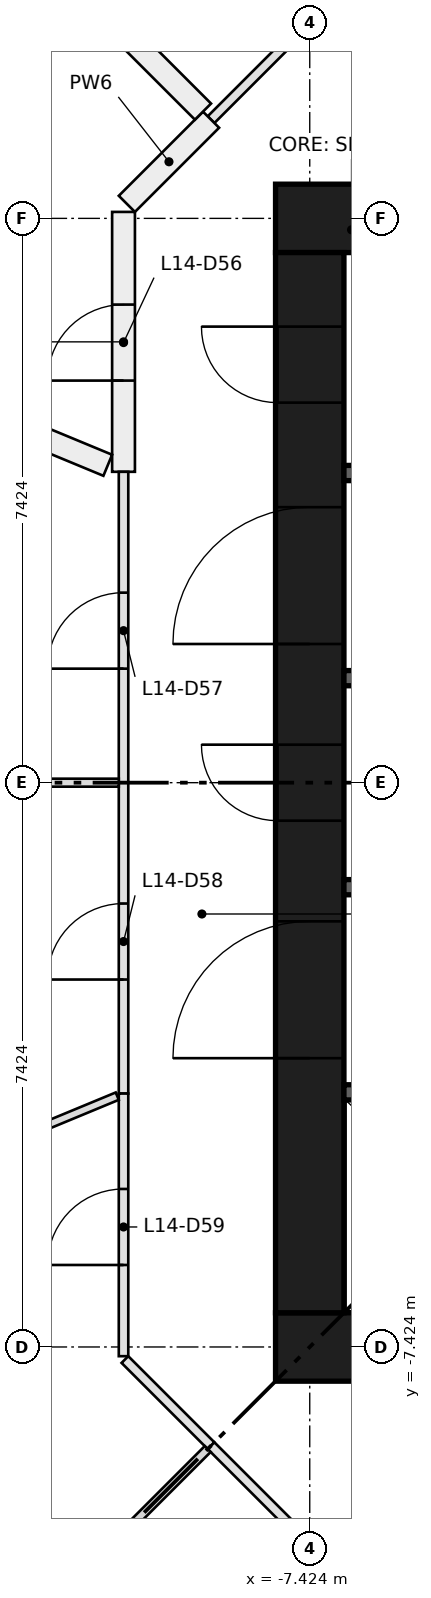
"""IFC4 building model, lengths in metres.
Left out: names, types, materials, properties, quantities, classifications, styles, units other than length and angle.
Written with IfcOpenShell. Run it as: python <this file> out.ifc"""

import sys

from ifc_helpers import new_model, si_unit, direction, frame, frame_2d, origin, place, context, subcontext, project, spatial, rectangle, extrude, element, fill, save


model = new_model("IFC4")
c1 = context("Model", 3, precision=1e-05, world=origin(), true_north=direction((0.0, 1.0)))
c2 = subcontext(c1, "Body", "Model", "MODEL_VIEW")
j1 = project(units=[si_unit("LENGTHUNIT", "METRE"), si_unit("PLANEANGLEUNIT", "RADIAN")], contexts=[c1])
p1 = place(None, origin())
s1 = spatial("IfcSite", under=j1, at=p1, CompositionType="ELEMENT")
p2 = place(p1, origin())
s2 = spatial("IfcBuilding", under=s1, at=p2, CompositionType="ELEMENT")
p3 = place(p2, frame((0.0, 0.0, 55.4)))
s3 = spatial("IfcBuildingStorey", under=s2, at=p3, CompositionType="ELEMENT", Elevation=55.4)
for number, where, z_axis, x_axis in (
    (1, (-7.874, -7.424, 0.0), (0.0, 0.0, 1.0), (1.0, 0.0, 0.0)),
    (2, (-7.874, 7.424, 0.0), (0.0, 0.0, 1.0), (1.0, 0.0, 0.0)),
):
    element("IfcWall", number, at=place(p3, frame(where, z_axis=z_axis, x_axis=x_axis)), inside=s3, PredefinedType="SHEAR", context=c2, shape_type="SweptSolid", body=[
        extrude(rectangle(XDim=15.748, YDim=0.9, at=frame_2d((7.874, 0.0))), origin(), (0.0, 0.0, 1.0), 3.65),
    ])
p4 = place(p3, frame((-7.424, -6.974, 0.0), z_axis=(0.0, 0.0, 1.0), x_axis=(0.0, 1.0, 0.0)))
e3 = element("IfcWall", 3, at=p4, inside=s3, PredefinedType="SHEAR", context=c2, shape_type="SweptSolid", body=[
    extrude(rectangle(XDim=13.948, YDim=0.9, at=frame_2d((6.974, 0.0))), origin(), (0.0, 0.0, 1.0), 3.65),
])
p5 = place(p4, frame((6.474, 0.0, 0.0)))
e4 = element("IfcOpeningElement", 4, at=p5, cuts=e3, PredefinedType="OPENING", context=c2, shape_type="SweptSolid", body=[
    extrude(rectangle(XDim=1.0, YDim=2.1, at=frame_2d((0.5, 1.05))), frame((0.0, 0.46, 0.0), z_axis=(0.0, -1.0, 0.0), x_axis=(1.0, 0.0, 0.0)), (0.0, 0.0, 1.0), 0.92),
])
p6 = place(p4, frame((3.35, 0.0, 0.0)))
e5 = element("IfcOpeningElement", 5, at=p6, cuts=e3, PredefinedType="OPENING", context=c2, shape_type="SweptSolid", body=[
    extrude(rectangle(XDim=1.8, YDim=2.1, at=frame_2d((0.9, 1.05))), frame((0.0, 0.46, 0.0), z_axis=(0.0, -1.0, 0.0), x_axis=(1.0, 0.0, 0.0)), (0.0, 0.0, 1.0), 0.92),
])
p7 = place(p4, frame((8.799, 0.0, 0.0)))
e6 = element("IfcOpeningElement", 6, at=p7, cuts=e3, PredefinedType="OPENING", context=c2, shape_type="SweptSolid", body=[
    extrude(rectangle(XDim=1.8, YDim=2.1, at=frame_2d((0.9, 1.05))), frame((0.0, 0.46, 0.0), z_axis=(0.0, -1.0, 0.0), x_axis=(1.0, 0.0, 0.0)), (0.0, 0.0, 1.0), 0.92),
])
p8 = place(p4, frame((11.974, 0.0, 0.0)))
e7 = element("IfcOpeningElement", 7, at=p8, cuts=e3, PredefinedType="OPENING", context=c2, shape_type="SweptSolid", body=[
    extrude(rectangle(XDim=1.0, YDim=2.1, at=frame_2d((0.5, 1.05))), frame((0.0, 0.46, 0.0), z_axis=(0.0, -1.0, 0.0), x_axis=(1.0, 0.0, 0.0)), (0.0, 0.0, 1.0), 0.92),
])
p9 = place(p3, frame((-6.974, -4.074, 0.0), z_axis=(0.0, 0.0, 1.0), x_axis=(1.0, 0.0, 0.0)))
e8 = element("IfcWall", 8, at=p9, inside=s3, PredefinedType="SHEAR", context=c2, shape_type="SweptSolid", body=[
    extrude(rectangle(XDim=13.948, YDim=0.2, at=frame_2d((6.974, 0.0))), origin(), (0.0, 0.0, 1.0), 3.3),
])
p10 = place(p9, frame((0.918, 0.0, 0.0)))
e9 = element("IfcOpeningElement", 9, at=p10, cuts=e8, PredefinedType="OPENING", context=c2, shape_type="SweptSolid", body=[
    extrude(rectangle(XDim=1.1, YDim=2.1, at=frame_2d((0.55, 1.05))), frame((0.0, 0.11, 0.0), z_axis=(0.0, -1.0, 0.0), x_axis=(1.0, 0.0, 0.0)), (0.0, 0.0, 1.0), 0.22),
])
p11 = place(p9, frame((4.055, 0.0, 0.0)))
e10 = element("IfcOpeningElement", 10, at=p11, cuts=e8, PredefinedType="OPENING", context=c2, shape_type="SweptSolid", body=[
    extrude(rectangle(XDim=1.1, YDim=2.1, at=frame_2d((0.55, 1.05))), frame((0.0, 0.11, 0.0), z_axis=(0.0, -1.0, 0.0), x_axis=(1.0, 0.0, 0.0)), (0.0, 0.0, 1.0), 0.22),
])
p12 = place(p9, frame((6.658, 0.0, 0.0)))
e11 = element("IfcOpeningElement", 11, at=p12, cuts=e8, PredefinedType="OPENING", context=c2, shape_type="SweptSolid", body=[
    extrude(rectangle(XDim=1.0, YDim=2.1, at=frame_2d((0.5, 1.05))), frame((0.0, 0.11, 0.0), z_axis=(0.0, -1.0, 0.0), x_axis=(1.0, 0.0, 0.0)), (0.0, 0.0, 1.0), 0.22),
])
p13 = place(p9, frame((8.627, 0.0, 0.0)))
e12 = element("IfcOpeningElement", 12, at=p13, cuts=e8, PredefinedType="OPENING", context=c2, shape_type="SweptSolid", body=[
    extrude(rectangle(XDim=1.0, YDim=2.1, at=frame_2d((0.5, 1.05))), frame((0.0, 0.11, 0.0), z_axis=(0.0, -1.0, 0.0), x_axis=(1.0, 0.0, 0.0)), (0.0, 0.0, 1.0), 0.22),
])
p14 = place(p9, frame((10.595, 0.0, 0.0)))
e13 = element("IfcOpeningElement", 13, at=p14, cuts=e8, PredefinedType="OPENING", context=c2, shape_type="SweptSolid", body=[
    extrude(rectangle(XDim=1.0, YDim=2.1, at=frame_2d((0.5, 1.05))), frame((0.0, 0.11, 0.0), z_axis=(0.0, -1.0, 0.0), x_axis=(1.0, 0.0, 0.0)), (0.0, 0.0, 1.0), 0.22),
])
p15 = place(p9, frame((12.564, 0.0, 0.0)))
e14 = element("IfcOpeningElement", 14, at=p15, cuts=e8, PredefinedType="OPENING", context=c2, shape_type="SweptSolid", body=[
    extrude(rectangle(XDim=1.0, YDim=2.1, at=frame_2d((0.5, 1.05))), frame((0.0, 0.11, 0.0), z_axis=(0.0, -1.0, 0.0), x_axis=(1.0, 0.0, 0.0)), (0.0, 0.0, 1.0), 0.22),
])
p16 = place(p3, frame((-6.974, 4.074, 0.0), z_axis=(0.0, 0.0, 1.0), x_axis=(1.0, 0.0, 0.0)))
e15 = element("IfcWall", 15, at=p16, inside=s3, PredefinedType="SHEAR", context=c2, shape_type="SweptSolid", body=[
    extrude(rectangle(XDim=6.974, YDim=0.2, at=frame_2d((3.487, 0.0))), origin(), (0.0, 0.0, 1.0), 3.3),
])
for number, where, z_axis, x_axis in (
    (16, (-6.974, -1.375, 0.0), (0.0, 0.0, 1.0), (1.0, 0.0, 0.0)),
    (17, (-6.974, 1.375, 0.0), (0.0, 0.0, 1.0), (1.0, 0.0, 0.0)),
):
    element("IfcWall", number, at=place(p3, frame(where, z_axis=z_axis, x_axis=x_axis)), inside=s3, PredefinedType="SHEAR", context=c2, shape_type="SweptSolid", body=[
        extrude(rectangle(XDim=2.6, YDim=0.2, at=frame_2d((1.3, 0.0))), origin(), (0.0, 0.0, 1.0), 3.3),
    ])
p17 = place(p3, frame((-8.722, 8.722, 0.0), z_axis=(0.0, 0.0, 1.0), x_axis=(0.707030604857, 0.70718294931, 0.0)))
e18 = element("IfcWall", 18, at=p17, inside=s3, PredefinedType="PARTITIONING", context=c2, shape_type="SweptSolid", body=[
    extrude(rectangle(XDim=1.603, YDim=0.125, at=frame_2d((0.801, 0.0))), origin(), (0.0, 0.0, 1.0), 3.3),
])
p18 = place(p3, frame((-9.874, 4.09, 0.0), z_axis=(0.0, 0.0, 1.0), x_axis=(0.0, 1.0, 0.0)))
e19 = element("IfcWall", 19, at=p18, inside=s3, PredefinedType="PARTITIONING", context=c2, shape_type="SweptSolid", body=[
    extrude(rectangle(XDim=3.419, YDim=0.3, at=frame_2d((1.709, 0.0))), origin(), (0.0, 0.0, 1.0), 3.3),
])
p19 = place(p18, frame((1.2, 0.0, 0.0)))
e20 = element("IfcOpeningElement", 20, at=p19, cuts=e19, PredefinedType="OPENING", context=c2, shape_type="SweptSolid", body=[
    extrude(rectangle(XDim=1.0, YDim=2.1, at=frame_2d((0.5, 1.05))), frame((0.0, 0.16, 0.0), z_axis=(0.0, -1.0, 0.0), x_axis=(1.0, 0.0, 0.0)), (0.0, 0.0, 1.0), 0.32),
])
p20 = place(p3, frame((-9.83, 7.615, 0.0), z_axis=(0.0, 0.0, 1.0), x_axis=(0.70718471217, 0.707028841614, 0.0)))
e21 = element("IfcWall", 21, at=p20, inside=s3, PredefinedType="PARTITIONING", context=c2, shape_type="SweptSolid", body=[
    extrude(rectangle(XDim=1.566, YDim=0.3, at=frame_2d((0.783, 0.0))), origin(), (0.0, 0.0, 1.0), 3.3),
])
p21 = place(p3, frame((-9.874, 0.0, 0.0), z_axis=(0.0, 0.0, 1.0), x_axis=(0.0, 1.0, 0.0)))
e22 = element("IfcWall", 22, at=p21, inside=s3, PredefinedType="PARTITIONING", context=c2, shape_type="SweptSolid", body=[
    extrude(rectangle(XDim=4.09, YDim=0.125, at=frame_2d((2.045, 0.0))), origin(), (0.0, 0.0, 1.0), 3.3),
])
p22 = place(p21, frame((1.5, 0.0, 0.0)))
e23 = element("IfcOpeningElement", 23, at=p22, cuts=e22, PredefinedType="OPENING", context=c2, shape_type="SweptSolid", body=[
    extrude(rectangle(XDim=1.0, YDim=2.1, at=frame_2d((0.5, 1.05))), frame((0.0, 0.073, 0.0), z_axis=(0.0, -1.0, 0.0), x_axis=(1.0, 0.0, 0.0)), (0.0, 0.0, 1.0), 0.145),
])
p23 = place(p3, frame((-9.874, -4.09, 0.0), z_axis=(0.0, 0.0, 1.0), x_axis=(0.0, 1.0, 0.0)))
e24 = element("IfcWall", 24, at=p23, inside=s3, PredefinedType="PARTITIONING", context=c2, shape_type="SweptSolid", body=[
    extrude(rectangle(XDim=4.09, YDim=0.125, at=frame_2d((2.045, 0.0))), origin(), (0.0, 0.0, 1.0), 3.3),
])
p24 = place(p23, frame((1.5, 0.0, 0.0)))
e25 = element("IfcOpeningElement", 25, at=p24, cuts=e24, PredefinedType="OPENING", context=c2, shape_type="SweptSolid", body=[
    extrude(rectangle(XDim=1.0, YDim=2.1, at=frame_2d((0.5, 1.05))), frame((0.0, 0.073, 0.0), z_axis=(0.0, -1.0, 0.0), x_axis=(1.0, 0.0, 0.0)), (0.0, 0.0, 1.0), 0.145),
])
p25 = place(p3, frame((-9.874, -7.545, 0.0), z_axis=(0.0, 0.0, 1.0), x_axis=(0.0, 1.0, 0.0)))
e26 = element("IfcWall", 26, at=p25, inside=s3, PredefinedType="PARTITIONING", context=c2, shape_type="SweptSolid", body=[
    extrude(rectangle(XDim=3.455, YDim=0.125, at=frame_2d((1.728, 0.0))), origin(), (0.0, 0.0, 1.0), 3.3),
])
p26 = place(p25, frame((1.2, 0.0, 0.0)))
e27 = element("IfcOpeningElement", 27, at=p26, cuts=e26, PredefinedType="OPENING", context=c2, shape_type="SweptSolid", body=[
    extrude(rectangle(XDim=1.0, YDim=2.1, at=frame_2d((0.5, 1.05))), frame((0.0, 0.073, 0.0), z_axis=(0.0, -1.0, 0.0), x_axis=(1.0, 0.0, 0.0)), (0.0, 0.0, 1.0), 0.145),
])
for number, where, z_axis, x_axis in (
    (28, (-8.722, -8.722, 0.0), (0.0, 0.0, 1.0), (-0.707, 0.707, 0.0)),
    (29, (-7.589, -9.856, 0.0), (0.0, 0.0, 1.0), (-0.707, 0.707, 0.0)),
):
    element("IfcWall", number, at=place(p3, frame(where, z_axis=z_axis, x_axis=x_axis)), inside=s3, PredefinedType="PARTITIONING", context=c2, shape_type="SweptSolid", body=[
        extrude(rectangle(XDim=1.603, YDim=0.125, at=frame_2d((0.801, 0.0))), origin(), (0.0, 0.0, 1.0), 3.3),
    ])
p27 = place(p3, frame((-8.829, 8.829, 0.0), z_axis=(0.0, 0.0, 1.0), x_axis=(-0.707106781187, 0.707106781187, 0.0)))
e30 = element("IfcWall", 30, at=p27, inside=s3, PredefinedType="PARTITIONING", context=c2, shape_type="SweptSolid", body=[
    extrude(rectangle(XDim=5.914, YDim=0.3, at=frame_2d((2.957, 0.0))), origin(), (0.0, 0.0, 1.0), 3.3),
])
p28 = place(p3, frame((-10.081, 4.176, 0.0), z_axis=(0.0, 0.0, 1.0), x_axis=(-0.923876033225, 0.382691880281, 0.0)))
e31 = element("IfcWall", 31, at=p28, inside=s3, PredefinedType="PARTITIONING", context=c2, shape_type="SweptSolid", body=[
    extrude(rectangle(XDim=3.318, YDim=0.3, at=frame_2d((1.659, 0.0))), origin(), (0.0, 0.0, 1.0), 3.3),
])
p29 = place(p3, frame((-9.937, 0.0, 0.0), z_axis=(0.0, 0.0, 1.0), x_axis=(-1.0, 0.0, 0.0)))
e32 = element("IfcWall", 32, at=p29, inside=s3, PredefinedType="PARTITIONING", context=c2, shape_type="SweptSolid", body=[
    extrude(rectangle(XDim=4.237, YDim=0.105, at=frame_2d((2.119, 0.0))), origin(), (0.0, 0.0, 1.0), 3.3),
])
p30 = place(p3, frame((-9.957, -4.124, 0.0), z_axis=(0.0, 0.0, 1.0), x_axis=(-0.923867748948, -0.382711879165, 0.0)))
e33 = element("IfcWall", 33, at=p30, inside=s3, PredefinedType="PARTITIONING", context=c2, shape_type="SweptSolid", body=[
    extrude(rectangle(XDim=3.453, YDim=0.105, at=frame_2d((1.727, 0.0))), origin(), (0.0, 0.0, 1.0), 3.3),
])
p31 = place(p3, frame((-13.011, -13.011, 0.0), z_axis=(0.0, 0.0, 1.0), x_axis=(0.707106781187, 0.707106781187, 0.0)))
e34 = element("IfcWall", 34, at=p31, inside=s3, PredefinedType="PARTITIONING", context=c2, shape_type="SweptSolid", body=[
    extrude(rectangle(XDim=6.002, YDim=0.11, at=frame_2d((3.001, 0.0))), origin(), (0.0, 0.0, 1.0), 3.3),
])
p32 = place(p5, origin())
e35 = element("IfcDoor", 35, at=p32, inside=s3, OperationType="SINGLE_SWING_RIGHT", PredefinedType="DOOR", context=c2, shape_type="SweptSolid", body=[
    extrude(rectangle(XDim=1.0, YDim=2.1, at=frame_2d((0.5, 1.05))), frame((0.0, 0.45, 0.0), z_axis=(0.0, -1.0, 0.0), x_axis=(1.0, 0.0, 0.0)), (0.0, 0.0, 1.0), 0.05),
])
fill(e4, e35)
p33 = place(p6, origin())
e36 = element("IfcDoor", 36, at=p33, inside=s3, OperationType="DOUBLE_DOOR_SINGLE_SWING", PredefinedType="DOOR", context=c2, shape_type="SweptSolid", body=[
    extrude(rectangle(XDim=1.8, YDim=2.1, at=frame_2d((0.9, 1.05))), frame((0.0, 0.025, 0.0), z_axis=(0.0, -1.0, 0.0), x_axis=(1.0, 0.0, 0.0)), (0.0, 0.0, 1.0), 0.05),
])
fill(e5, e36)
p34 = place(p7, origin())
e37 = element("IfcDoor", 37, at=p34, inside=s3, OperationType="DOUBLE_DOOR_SINGLE_SWING", PredefinedType="DOOR", context=c2, shape_type="SweptSolid", body=[
    extrude(rectangle(XDim=1.8, YDim=2.1, at=frame_2d((0.9, 1.05))), frame((0.0, 0.025, 0.0), z_axis=(0.0, -1.0, 0.0), x_axis=(1.0, 0.0, 0.0)), (0.0, 0.0, 1.0), 0.05),
])
fill(e6, e37)
p35 = place(p8, origin())
e38 = element("IfcDoor", 38, at=p35, inside=s3, OperationType="SINGLE_SWING_RIGHT", PredefinedType="DOOR", context=c2, shape_type="SweptSolid", body=[
    extrude(rectangle(XDim=1.0, YDim=2.1, at=frame_2d((0.5, 1.05))), frame((0.0, 0.45, 0.0), z_axis=(0.0, -1.0, 0.0), x_axis=(1.0, 0.0, 0.0)), (0.0, 0.0, 1.0), 0.05),
])
fill(e7, e38)
p36 = place(p19, origin())
e39 = element("IfcDoor", 39, at=p36, inside=s3, OperationType="SINGLE_SWING_LEFT", PredefinedType="DOOR", context=c2, shape_type="SweptSolid", body=[
    extrude(rectangle(XDim=1.0, YDim=2.1, at=frame_2d((0.5, 1.05))), frame((0.0, 0.025, 0.0), z_axis=(0.0, -1.0, 0.0), x_axis=(1.0, 0.0, 0.0)), (0.0, 0.0, 1.0), 0.05),
])
fill(e20, e39)
p37 = place(p22, origin())
e40 = element("IfcDoor", 40, at=p37, inside=s3, OperationType="SINGLE_SWING_LEFT", PredefinedType="DOOR", context=c2, shape_type="SweptSolid", body=[
    extrude(rectangle(XDim=1.0, YDim=2.1, at=frame_2d((0.5, 1.05))), frame((0.0, 0.025, 0.0), z_axis=(0.0, -1.0, 0.0), x_axis=(1.0, 0.0, 0.0)), (0.0, 0.0, 1.0), 0.05),
])
fill(e23, e40)
p38 = place(p24, origin())
e41 = element("IfcDoor", 41, at=p38, inside=s3, OperationType="SINGLE_SWING_LEFT", PredefinedType="DOOR", context=c2, shape_type="SweptSolid", body=[
    extrude(rectangle(XDim=1.0, YDim=2.1, at=frame_2d((0.5, 1.05))), frame((0.0, 0.025, 0.0), z_axis=(0.0, -1.0, 0.0), x_axis=(1.0, 0.0, 0.0)), (0.0, 0.0, 1.0), 0.05),
])
fill(e25, e41)
p39 = place(p26, origin())
e42 = element("IfcDoor", 42, at=p39, inside=s3, OperationType="SINGLE_SWING_LEFT", PredefinedType="DOOR", context=c2, shape_type="SweptSolid", body=[
    extrude(rectangle(XDim=1.0, YDim=2.1, at=frame_2d((0.5, 1.05))), frame((0.0, 0.025, 0.0), z_axis=(0.0, -1.0, 0.0), x_axis=(1.0, 0.0, 0.0)), (0.0, 0.0, 1.0), 0.05),
])
fill(e27, e42)
save(model, sys.argv[1])
